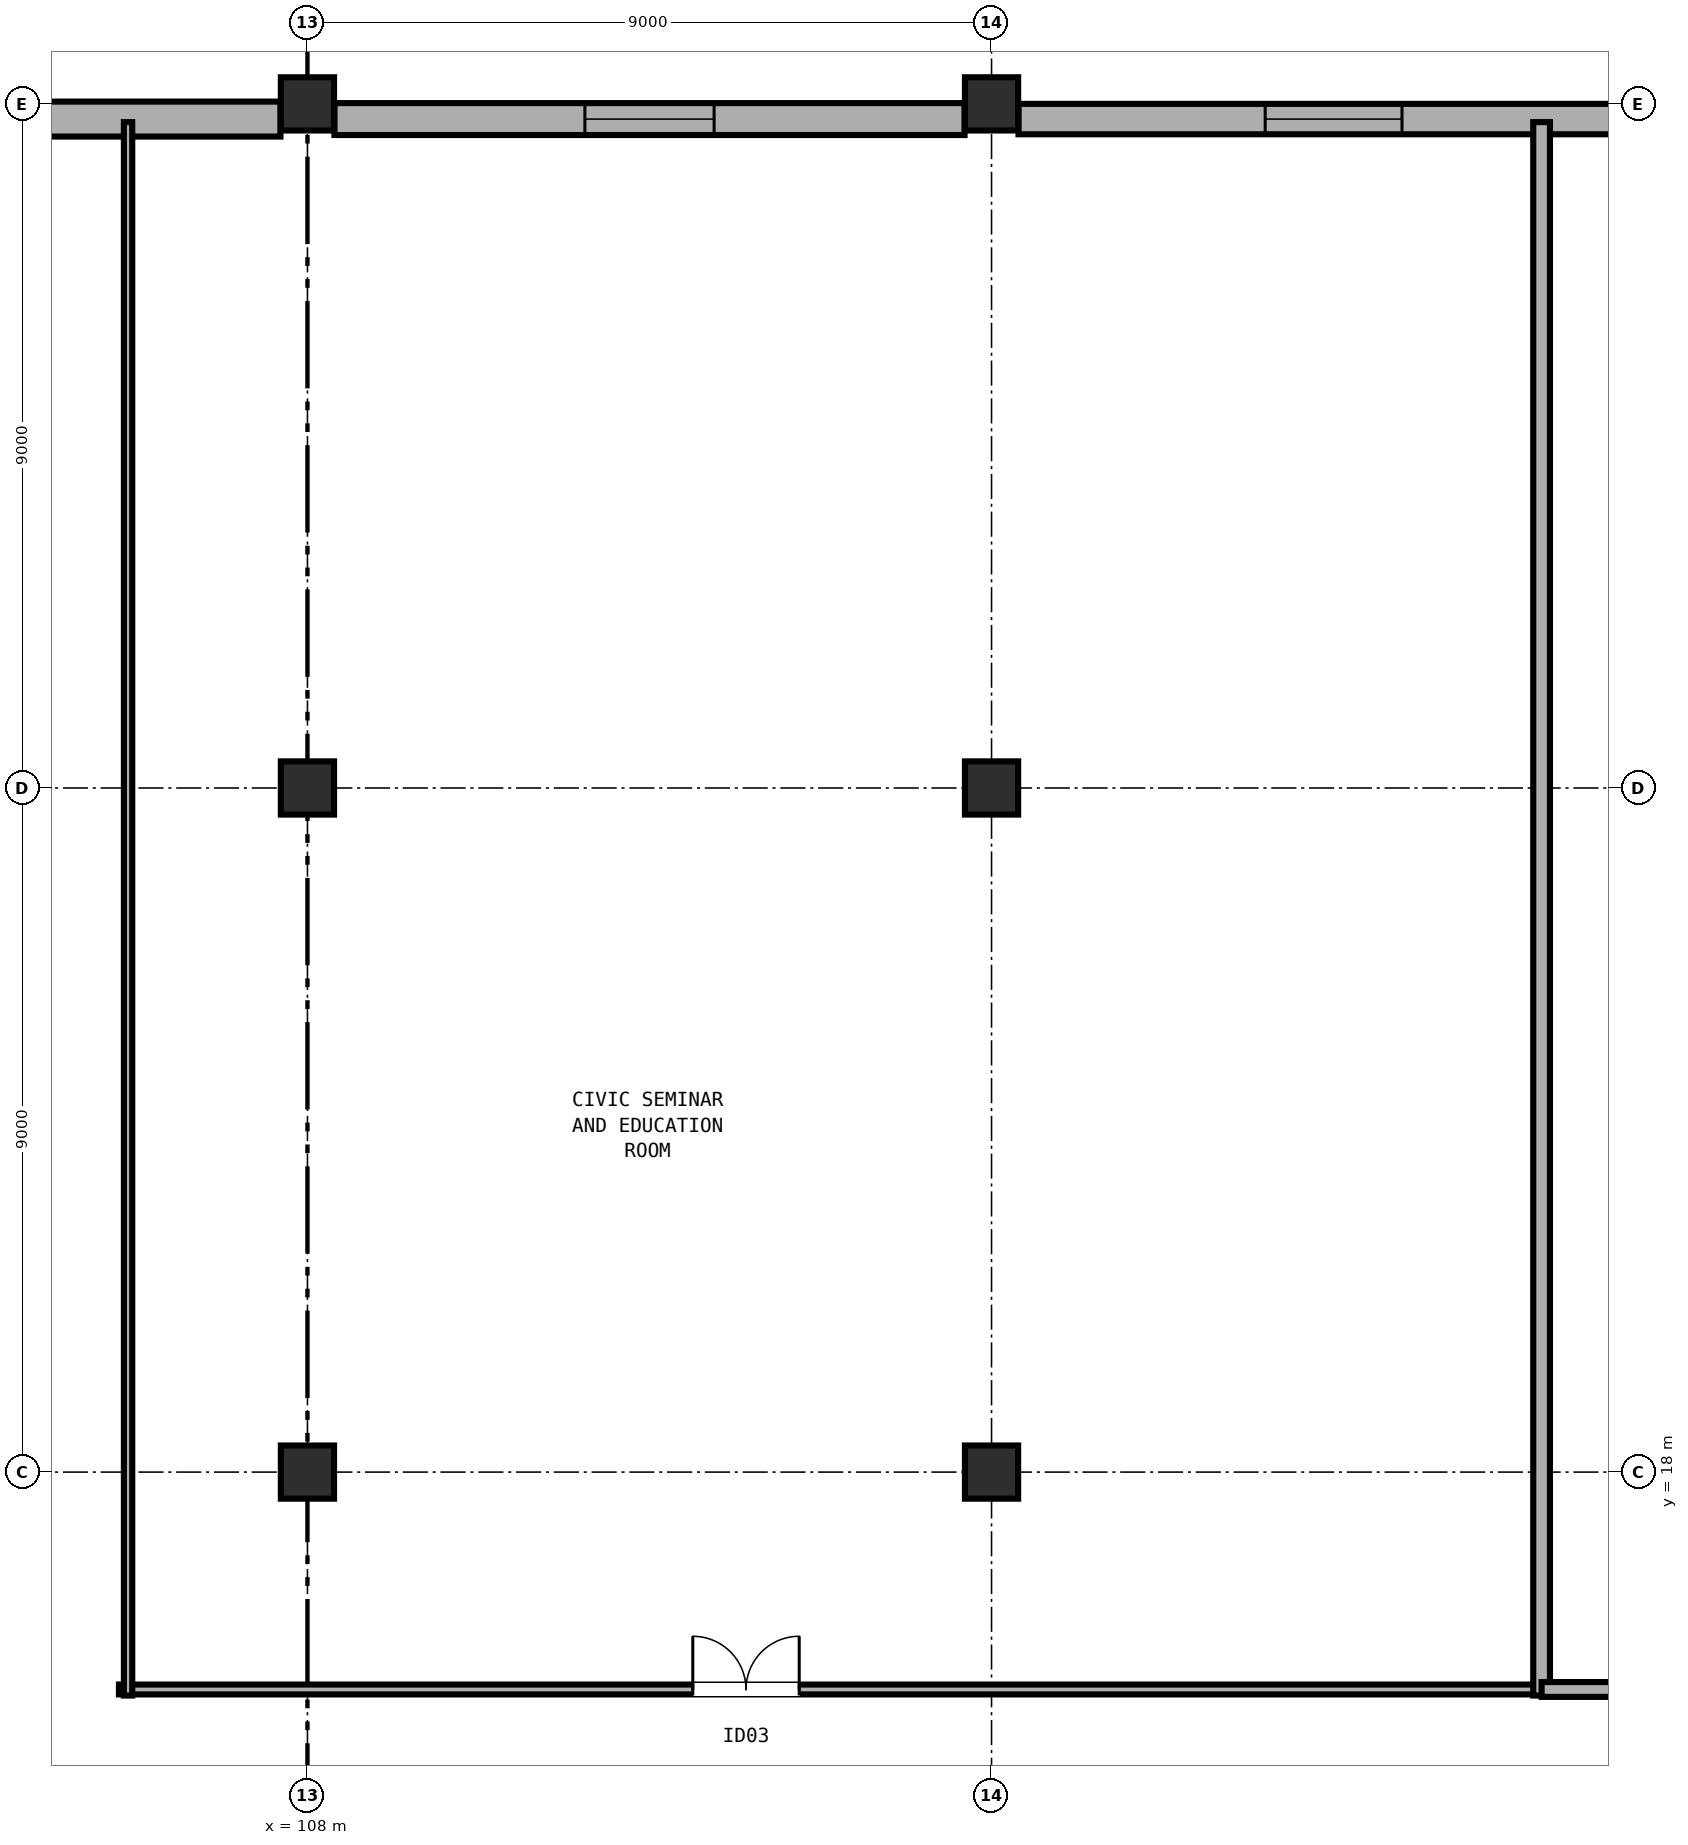
"""IFC4 building model, lengths in metres.
Left out: names, types, materials, properties, quantities, classifications, styles, units other than length and angle.
Written with IfcOpenShell. Run it as: python <this file> out.ifc"""

import sys

from ifc_helpers import new_model, si_unit, direction, frame, frame_2d, origin, origin_2d, place, context, subcontext, project, spatial, rectangle, extrude, element, fill, save


model = new_model("IFC4")
c1 = context("Model", 3, precision=1e-05, world=origin(), true_north=direction((0.0, 1.0)))
c2 = subcontext(c1, "Body", "Model", "MODEL_VIEW")
j1 = project(units=[si_unit("LENGTHUNIT", "METRE"), si_unit("PLANEANGLEUNIT", "RADIAN")], contexts=[c1])
p1 = place(None, origin())
s1 = spatial("IfcSite", under=j1, at=p1, CompositionType="ELEMENT")
p2 = place(p1, origin())
s2 = spatial("IfcBuilding", under=s1, at=p2, CompositionType="ELEMENT")
p3 = place(p2, frame((0.0, 0.0, 9.6)))
s3 = spatial("IfcBuildingStorey", under=s2, at=p3, CompositionType="ELEMENT", Elevation=9.6)
for number, where, z_axis, x_axis in (
    (1, (108.0, 18.0, 0.0), (0.0, 0.0, 1.0), (1.0, 0.0, 0.0)),
    (2, (108.0, 27.0, 0.0), (0.0, 0.0, 1.0), (1.0, 0.0, 0.0)),
    (3, (108.0, 36.0, 0.0), (0.0, 0.0, 1.0), (1.0, 0.0, 0.0)),
    (4, (117.0, 18.0, 0.0), (0.0, 0.0, 1.0), (1.0, 0.0, 0.0)),
    (5, (117.0, 27.0, 0.0), (0.0, 0.0, 1.0), (1.0, 0.0, 0.0)),
    (6, (117.0, 36.0, 0.0), (0.0, 0.0, 1.0), (1.0, 0.0, 0.0)),
):
    element("IfcColumn", number, at=place(p3, frame(where, z_axis=z_axis, x_axis=x_axis)), inside=s3, PredefinedType="COLUMN", context=c2, shape_type="SweptSolid", body=[
        extrude(rectangle(XDim=0.7, YDim=0.7, at=origin_2d()), origin(), (0.0, 0.0, 1.0), 4.8),
    ])
p4 = place(p3, frame((99.355, 35.8, 0.0), z_axis=(0.0, 0.0, 1.0), x_axis=(1.0, 0.0, 0.0)))
e7 = element("IfcWall", 7, at=p4, inside=s3, PredefinedType="SOLIDWALL", context=c2, shape_type="SweptSolid", body=[
    extrude(rectangle(XDim=8.29, YDim=0.46, at=frame_2d((4.145, 0.0))), origin(), (0.0, 0.0, 1.0), 3.58),
])
p5 = place(p4, frame((3.345, 0.0, 0.9)))
e8 = element("IfcOpeningElement", 8, at=p5, cuts=e7, PredefinedType="OPENING", context=c2, shape_type="SweptSolid", body=[
    extrude(rectangle(XDim=1.6, YDim=1.65, at=frame_2d((0.8, 0.825))), frame((0.0, 0.24, 0.0), z_axis=(0.0, -1.0, 0.0), x_axis=(1.0, 0.0, 0.0)), (0.0, 0.0, 1.0), 0.48),
])
p6 = place(p3, frame((108.355, 35.8, 0.0), z_axis=(0.0, 0.0, 1.0), x_axis=(1.0, 0.0, 0.0)))
e9 = element("IfcWall", 9, at=p6, inside=s3, PredefinedType="SOLIDWALL", context=c2, shape_type="SweptSolid", body=[
    extrude(rectangle(XDim=8.29, YDim=0.42, at=frame_2d((4.145, 0.0))), origin(), (0.0, 0.0, 1.0), 3.58),
])
p7 = place(p6, frame((3.295, 0.0, 0.9)))
e10 = element("IfcOpeningElement", 10, at=p7, cuts=e9, PredefinedType="OPENING", context=c2, shape_type="SweptSolid", body=[
    extrude(rectangle(XDim=1.7, YDim=1.7, at=frame_2d((0.85, 0.85))), frame((0.0, 0.22, 0.0), z_axis=(0.0, -1.0, 0.0), x_axis=(1.0, 0.0, 0.0)), (0.0, 0.0, 1.0), 0.44),
])
p8 = place(p3, frame((117.355, 35.8, 0.0), z_axis=(0.0, 0.0, 1.0), x_axis=(1.0, 0.0, 0.0)))
e11 = element("IfcWall", 11, at=p8, inside=s3, PredefinedType="SOLIDWALL", context=c2, shape_type="SweptSolid", body=[
    extrude(rectangle(XDim=8.29, YDim=0.4, at=frame_2d((4.145, 0.0))), origin(), (0.0, 0.0, 1.0), 3.58),
])
p9 = place(p8, frame((3.245, 0.0, 0.9)))
e12 = element("IfcOpeningElement", 12, at=p9, cuts=e11, PredefinedType="OPENING", context=c2, shape_type="SweptSolid", body=[
    extrude(rectangle(XDim=1.8, YDim=1.75, at=frame_2d((0.9, 0.875))), frame((0.0, 0.21, 0.0), z_axis=(0.0, -1.0, 0.0), x_axis=(1.0, 0.0, 0.0)), (0.0, 0.0, 1.0), 0.42),
])
p10 = place(p3, frame((105.52, 15.14, 0.0), z_axis=(0.0, 0.0, 1.0), x_axis=(1.0, 0.0, 0.0)))
e13 = element("IfcWall", 13, at=p10, inside=s3, PredefinedType="PARTITIONING", context=c2, shape_type="SweptSolid", body=[
    extrude(rectangle(XDim=18.717, YDim=0.13, at=frame_2d((9.358, 0.0))), origin(), (0.0, 0.0, 1.0), 3.56),
])
p11 = place(p10, frame((7.55, 0.0, 0.0)))
e14 = element("IfcOpeningElement", 14, at=p11, cuts=e13, PredefinedType="OPENING", context=c2, shape_type="SweptSolid", body=[
    extrude(rectangle(XDim=1.4, YDim=2.15, at=frame_2d((0.7, 1.075))), frame((0.0, 0.075, 0.0), z_axis=(0.0, -1.0, 0.0), x_axis=(1.0, 0.0, 0.0)), (0.0, 0.0, 1.0), 0.15),
])
p12 = place(p3, frame((105.64, 15.06, 0.0), z_axis=(0.0, 0.0, 1.0), x_axis=(0.0, 1.0, 0.0)))
e15 = element("IfcWall", 15, at=p12, inside=s3, PredefinedType="PARTITIONING", context=c2, shape_type="SweptSolid", body=[
    extrude(rectangle(XDim=20.7, YDim=0.11, at=frame_2d((10.35, 0.0))), origin(), (0.0, 0.0, 1.0), 3.56),
])
p13 = place(p3, frame((124.237, 35.76, 0.0), z_axis=(0.0, 0.0, 1.0), x_axis=(0.0, -1.0, 0.0)))
e16 = element("IfcWall", 16, at=p13, inside=s3, PredefinedType="PARTITIONING", context=c2, shape_type="SweptSolid", body=[
    extrude(rectangle(XDim=20.7, YDim=0.22, at=frame_2d((10.35, 0.0))), origin(), (0.0, 0.0, 1.0), 3.56),
])
p14 = place(p3, frame((124.237, 15.14, 0.0), z_axis=(0.0, 0.0, 1.0), x_axis=(1.0, 0.0, 0.0)))
e17 = element("IfcWall", 17, at=p14, inside=s3, PredefinedType="PARTITIONING", context=c2, shape_type="SweptSolid", body=[
    extrude(rectangle(XDim=18.596, YDim=0.195, at=frame_2d((9.298, 0.0))), origin(), (0.0, 0.0, 1.0), 3.56),
])
p15 = place(p14, frame((6.246, 0.0, 0.0)))
e18 = element("IfcOpeningElement", 18, at=p15, cuts=e17, PredefinedType="OPENING", context=c2, shape_type="SweptSolid", body=[
    extrude(rectangle(XDim=1.7, YDim=2.2, at=frame_2d((0.85, 1.1))), frame((0.0, 0.107, 0.0), z_axis=(0.0, -1.0, 0.0), x_axis=(1.0, 0.0, 0.0)), (0.0, 0.0, 1.0), 0.215),
])
p16 = place(p7, origin())
e19 = element("IfcWindow", 19, at=p16, inside=s3, PartitioningType="SINGLE_PANEL", PredefinedType="WINDOW", context=c2, shape_type="SweptSolid", body=[
    extrude(rectangle(XDim=1.7, YDim=1.7, at=frame_2d((0.85, 0.85))), frame((0.0, 0.03, 0.0), z_axis=(0.0, -1.0, 0.0), x_axis=(1.0, 0.0, 0.0)), (0.0, 0.0, 1.0), 0.06),
])
fill(e10, e19)
p17 = place(p9, origin())
e20 = element("IfcWindow", 20, at=p17, inside=s3, PartitioningType="DOUBLE_PANEL_VERTICAL", PredefinedType="WINDOW", context=c2, shape_type="SweptSolid", body=[
    extrude(rectangle(XDim=1.8, YDim=1.75, at=frame_2d((0.9, 0.875))), frame((0.0, 0.03, 0.0), z_axis=(0.0, -1.0, 0.0), x_axis=(1.0, 0.0, 0.0)), (0.0, 0.0, 1.0), 0.06),
])
fill(e12, e20)
p18 = place(p11, origin())
e21 = element("IfcDoor", 21, at=p18, inside=s3, OperationType="DOUBLE_DOOR_SINGLE_SWING", PredefinedType="DOOR", context=c2, shape_type="SweptSolid", body=[
    extrude(rectangle(XDim=1.4, YDim=2.15, at=frame_2d((0.7, 1.075))), frame((0.0, 0.025, 0.0), z_axis=(0.0, -1.0, 0.0), x_axis=(1.0, 0.0, 0.0)), (0.0, 0.0, 1.0), 0.05),
])
fill(e14, e21)
save(model, sys.argv[1])
